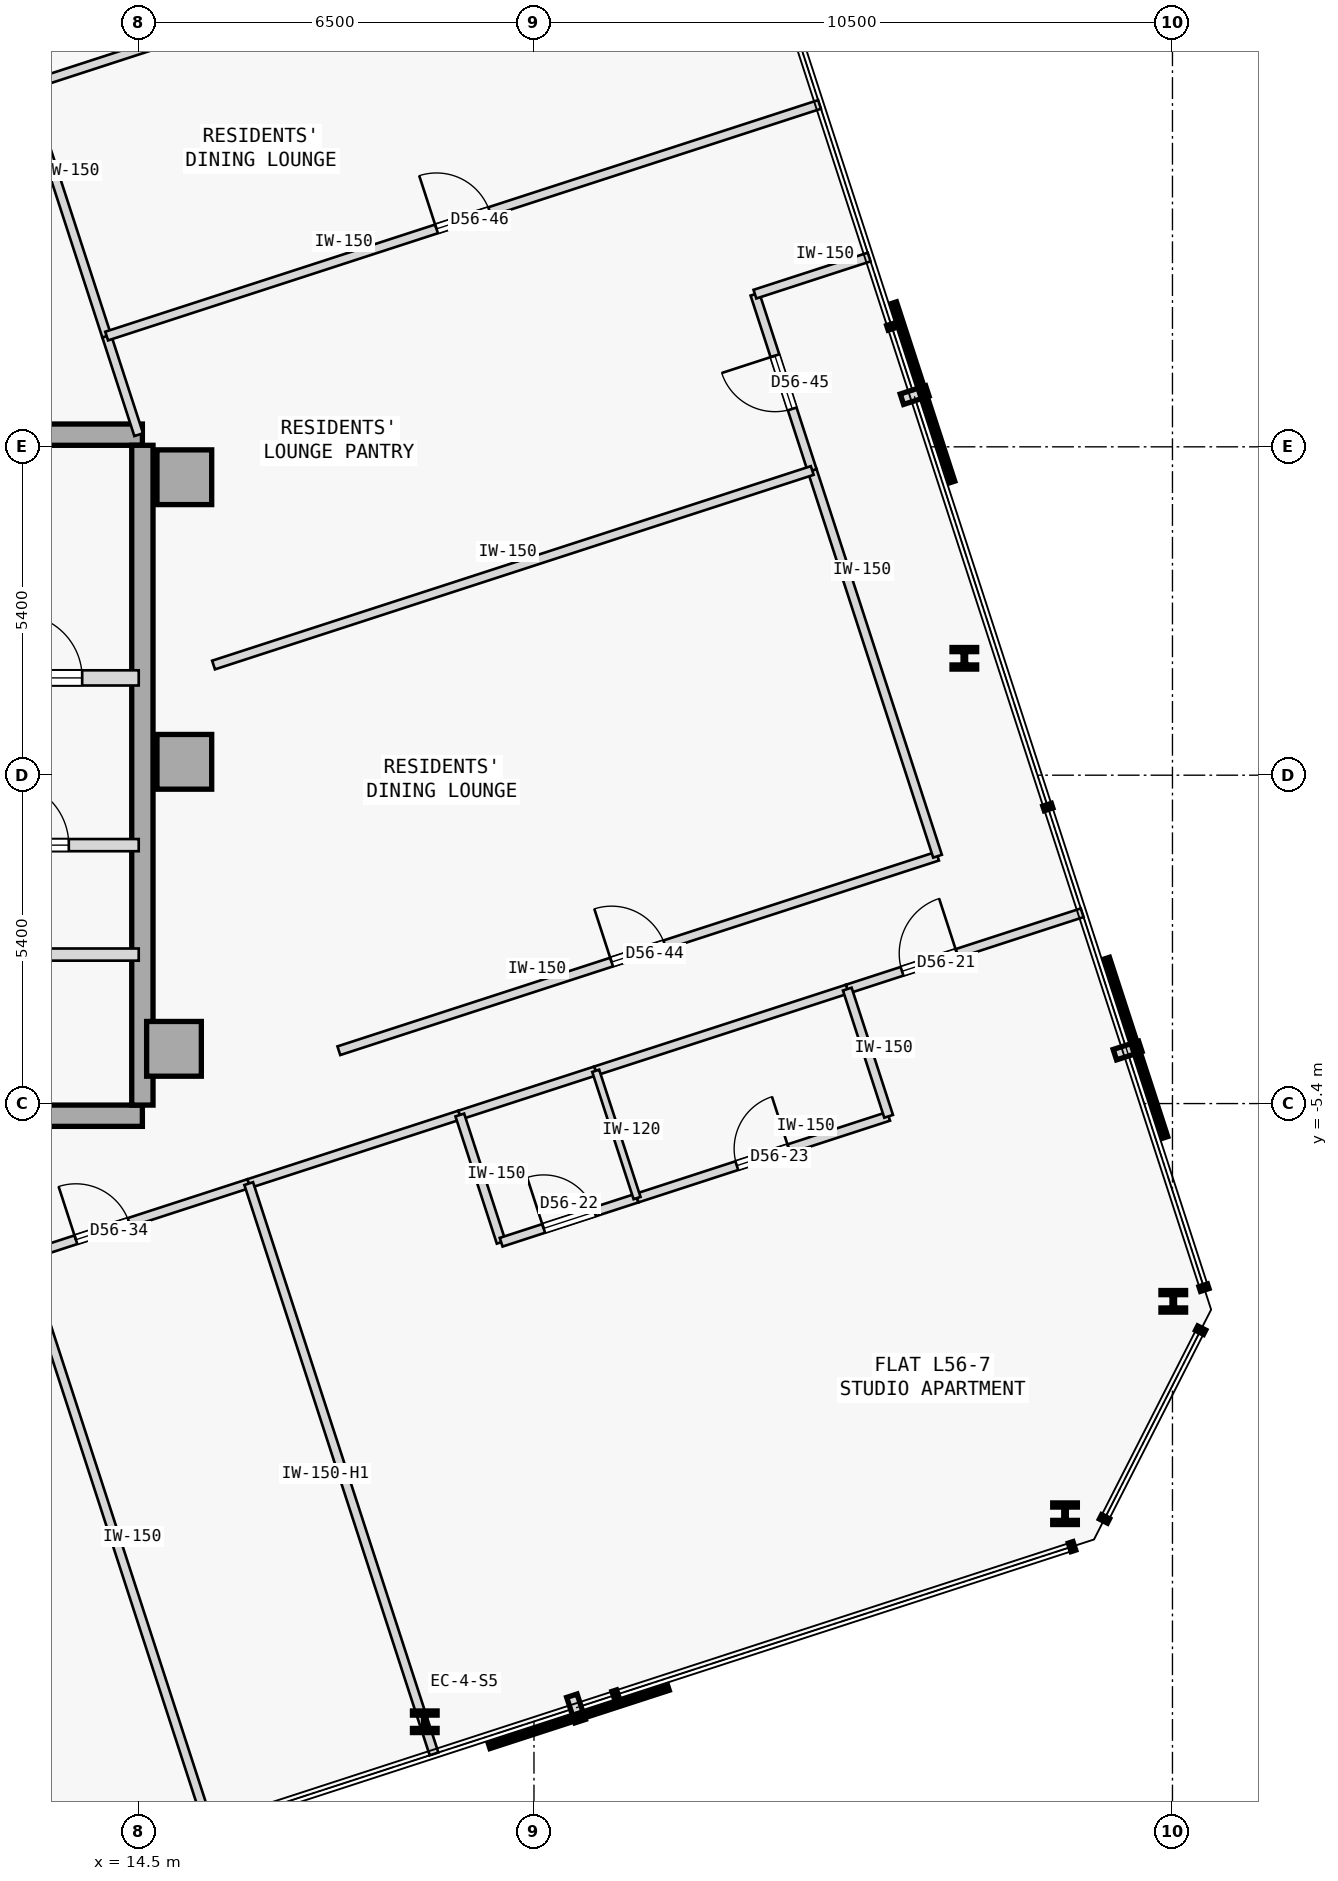
"""IFC4 building model, lengths in metres.
Left out: names, types, materials, properties, quantities, classifications, styles, units other than length and angle.
Written with IfcOpenShell. Run it as: python <this file> out.ifc"""

import sys

from ifc_helpers import new_model, si_unit, direction, frame, frame_2d, origin, origin_2d, place, context, subcontext, project, spatial, rectangle, i_section, extrude, element, fill, save


model = new_model("IFC4")
c1 = context("Model", 3, precision=1e-05, world=origin(), true_north=direction((0.0, 1.0)))
c2 = subcontext(c1, "Body", "Model", "MODEL_VIEW")
j1 = project(units=[si_unit("LENGTHUNIT", "METRE"), si_unit("PLANEANGLEUNIT", "RADIAN")], contexts=[c1])
p1 = place(None, origin())
s1 = spatial("IfcSite", under=j1, at=p1, CompositionType="ELEMENT")
p2 = place(p1, origin())
s2 = spatial("IfcBuilding", under=s1, at=p2, CompositionType="ELEMENT")
p3 = place(p2, frame((0.0, 0.0, 214.25)))
s3 = spatial("IfcBuildingStorey", under=s2, at=p3, CompositionType="ELEMENT", Elevation=214.25)
for number, where, z_axis, x_axis in (
    (1, (15.25, 4.9, 0.0), (0.0, 0.0, 1.0), (1.0, 0.0, 0.0)),
    (2, (15.25, 0.22, 0.0), (0.0, 0.0, 1.0), (1.0, 0.0, 0.0)),
    (3, (15.08, -4.5, 0.0), (0.0, 0.0, 1.0), (1.0, 0.0, 0.0)),
):
    element("IfcColumn", number, at=place(p3, frame(where, z_axis=z_axis, x_axis=x_axis)), inside=s3, PredefinedType="COLUMN", context=c2, shape_type="SweptSolid", body=[
        extrude(rectangle(XDim=0.9, YDim=0.9, at=origin_2d()), origin(), (0.0, 0.0, 1.0), 3.35),
    ])
p4 = place(p3, frame((3.15, 5.6, 0.0), z_axis=(0.0, 0.0, 1.0), x_axis=(1.0, 0.0, 0.0)))
e4 = element("IfcWall", 4, at=p4, inside=s3, PredefinedType="SHEAR", context=c2, shape_type="SweptSolid", body=[
    extrude(rectangle(XDim=11.41, YDim=0.35, at=frame_2d((5.705, 0.0))), origin(), (0.0, 0.0, 1.0), 3.125),
])
p5 = place(p3, frame((3.7, -5.6, 0.0), z_axis=(0.0, 0.0, 1.0), x_axis=(1.0, 0.0, 0.0)))
e5 = element("IfcWall", 5, at=p5, inside=s3, PredefinedType="SHEAR", context=c2, shape_type="SweptSolid", body=[
    extrude(rectangle(XDim=10.86, YDim=0.35, at=frame_2d((5.43, 0.0))), origin(), (0.0, 0.0, 1.0), 3.125),
])
p6 = place(p3, frame((14.56, -5.425, 0.0), z_axis=(0.0, 0.0, 1.0), x_axis=(0.0, 1.0, 0.0)))
e6 = element("IfcWall", 6, at=p6, inside=s3, PredefinedType="SHEAR", context=c2, shape_type="SweptSolid", body=[
    extrude(rectangle(XDim=10.85, YDim=0.35, at=frame_2d((5.425, 0.0))), origin(), (0.0, 0.0, 1.0), 3.125),
])
for number, where, z_axis, x_axis in (
    (7, (19.204, -15.566, 0.0), (0.0, 0.0, 1.0), (1.0, 0.0, 0.0)),
    (8, (29.734, -12.145, 0.0), (0.0, 0.0, 1.0), (1.0, 0.0, 0.0)),
    (9, (31.513, -8.652, 0.0), (0.0, 0.0, 1.0), (1.0, 0.0, 0.0)),
    (10, (28.078, 1.922, 0.0), (0.0, 0.0, 1.0), (1.0, 0.0, 0.0)),
):
    element("IfcColumn", number, at=place(p3, frame(where, z_axis=z_axis, x_axis=x_axis)), inside=s3, PredefinedType="COLUMN", context=c2, shape_type="SweptSolid", body=[
        extrude(i_section(OverallWidth=0.405, OverallDepth=0.355, WebThickness=0.042, FlangeThickness=0.068, FilletRadius=0.015, at=origin_2d()), origin(), (0.0, 0.0, 1.0), 3.35),
    ])
p7 = place(p3, frame((10.9, 1.6, 0.0), z_axis=(0.0, 0.0, 1.0), x_axis=(1.0, 0.0, 0.0)))
e11 = element("IfcWall", 11, at=p7, inside=s3, PredefinedType="STANDARD", context=c2, shape_type="SweptSolid", body=[
    extrude(rectangle(XDim=3.6, YDim=0.25, at=frame_2d((1.8, 0.0))), origin(), (0.0, 0.0, 1.0), 3.125),
])
p8 = place(p7, frame((1.62, 0.0, 0.0)))
e12 = element("IfcOpeningElement", 12, at=p8, cuts=e11, PredefinedType="OPENING", context=c2, shape_type="SweptSolid", body=[
    extrude(rectangle(XDim=1.05, YDim=2.15, at=frame_2d((0.525, 1.075))), frame((0.0, 0.135, 0.0), z_axis=(0.0, -1.0, 0.0), x_axis=(1.0, 0.0, 0.0)), (0.0, 0.0, 1.0), 0.27),
])
p9 = place(p3, frame((11.55, -1.15, 0.0), z_axis=(0.0, 0.0, 1.0), x_axis=(1.0, 0.0, 0.0)))
e13 = element("IfcWall", 13, at=p9, inside=s3, PredefinedType="STANDARD", context=c2, shape_type="SweptSolid", body=[
    extrude(rectangle(XDim=2.95, YDim=0.2, at=frame_2d((1.475, 0.0))), origin(), (0.0, 0.0, 1.0), 3.125),
])
p10 = place(p9, frame((0.75, 0.0, 0.0)))
e14 = element("IfcOpeningElement", 14, at=p10, cuts=e13, PredefinedType="OPENING", context=c2, shape_type="SweptSolid", body=[
    extrude(rectangle(XDim=1.05, YDim=2.18, at=frame_2d((0.525, 1.09))), frame((0.0, 0.11, 0.0), z_axis=(0.0, -1.0, 0.0), x_axis=(1.0, 0.0, 0.0)), (0.0, 0.0, 1.0), 0.22),
])
p11 = place(p3, frame((3.7, -2.95, 0.0), z_axis=(0.0, 0.0, 1.0), x_axis=(1.0, 0.0, 0.0)))
e15 = element("IfcWall", 15, at=p11, inside=s3, PredefinedType="STANDARD", context=c2, shape_type="SweptSolid", body=[
    extrude(rectangle(XDim=10.8, YDim=0.2, at=frame_2d((5.4, 0.0))), origin(), (0.0, 0.0, 1.0), 3.125),
])
p12 = place(p11, frame((0.53, 0.0, 0.0)))
e16 = element("IfcOpeningElement", 16, at=p12, cuts=e15, PredefinedType="OPENING", context=c2, shape_type="SweptSolid", body=[
    extrude(rectangle(XDim=1.1, YDim=2.15, at=frame_2d((0.55, 1.075))), frame((0.0, 0.11, 0.0), z_axis=(0.0, -1.0, 0.0), x_axis=(1.0, 0.0, 0.0)), (0.0, 0.0, 1.0), 0.22),
])
p13 = place(p11, frame((3.71, 0.0, 0.0)))
e17 = element("IfcOpeningElement", 17, at=p13, cuts=e15, PredefinedType="OPENING", context=c2, shape_type="SweptSolid", body=[
    extrude(rectangle(XDim=0.92, YDim=2.15, at=frame_2d((0.46, 1.075))), frame((0.0, 0.11, 0.0), z_axis=(0.0, -1.0, 0.0), x_axis=(1.0, 0.0, 0.0)), (0.0, 0.0, 1.0), 0.22),
])
p14 = place(p11, frame((8.03, 0.0, 0.0)))
e18 = element("IfcOpeningElement", 18, at=p14, cuts=e15, PredefinedType="OPENING", context=c2, shape_type="SweptSolid", body=[
    extrude(rectangle(XDim=0.92, YDim=2.15, at=frame_2d((0.46, 1.075))), frame((0.0, 0.11, 0.0), z_axis=(0.0, -1.0, 0.0), x_axis=(1.0, 0.0, 0.0)), (0.0, 0.0, 1.0), 0.22),
])
p15 = place(p3, frame((16.309, -6.716, 0.0), z_axis=(0.0, 0.0, 1.0), x_axis=(0.951057168147, 0.309014988174, 0.0)))
e19 = element("IfcWall", 19, at=p15, inside=s3, PredefinedType="PARTITIONING", context=c2, shape_type="SweptSolid", body=[
    extrude(rectangle(XDim=3.65, YDim=0.15, at=frame_2d((1.825, 0.0))), origin(), (0.0, 0.0, 1.0), 3.125),
])
p16 = place(p3, frame((26.152, -3.518, 0.0), z_axis=(0.0, 0.0, 1.0), x_axis=(0.951048201303, 0.309042584119, 0.0)))
e20 = element("IfcWall", 20, at=p16, inside=s3, PredefinedType="PARTITIONING", context=c2, shape_type="SweptSolid", body=[
    extrude(rectangle(XDim=4.062, YDim=0.15, at=frame_2d((2.031, 0.0))), origin(), (0.0, 0.0, 1.0), 3.125),
])
p17 = place(p16, frame((0.947, 0.0, 0.0)))
e21 = element("IfcOpeningElement", 21, at=p17, cuts=e20, PredefinedType="OPENING", context=c2, shape_type="SweptSolid", body=[
    extrude(rectangle(XDim=0.95, YDim=2.15, at=frame_2d((0.475, 1.075))), frame((0.0, 0.085, 0.0), z_axis=(0.0, -1.0, 0.0), x_axis=(1.0, 0.0, 0.0)), (0.0, 0.0, 1.0), 0.17),
])
p18 = place(p3, frame((19.78, -5.588, 0.0), z_axis=(0.0, 0.0, 1.0), x_axis=(0.951076048914, 0.308956872689, 0.0)))
e22 = element("IfcWall", 22, at=p18, inside=s3, PredefinedType="PARTITIONING", context=c2, shape_type="SweptSolid", body=[
    extrude(rectangle(XDim=2.35, YDim=0.15, at=frame_2d((1.175, 0.0))), origin(), (0.0, 0.0, 1.0), 3.125),
])
p19 = place(p3, frame((22.015, -4.862, 0.0), z_axis=(0.0, 0.0, 1.0), x_axis=(0.951052627573, 0.309028962374, 0.0)))
e23 = element("IfcWall", 23, at=p19, inside=s3, PredefinedType="PARTITIONING", context=c2, shape_type="SweptSolid", body=[
    extrude(rectangle(XDim=4.35, YDim=0.15, at=frame_2d((2.175, 0.0))), origin(), (0.0, 0.0, 1.0), 3.125),
])
p20 = place(p3, frame((12.609, -7.918, 0.0), z_axis=(0.0, 0.0, 1.0), x_axis=(0.951047443558, 0.309044915995, 0.0)))
e24 = element("IfcWall", 24, at=p20, inside=s3, PredefinedType="PARTITIONING", context=c2, shape_type="SweptSolid", body=[
    extrude(rectangle(XDim=3.89, YDim=0.15, at=frame_2d((1.945, 0.0))), origin(), (0.0, 0.0, 1.0), 3.125),
])
p21 = place(p20, frame((0.902, 0.0, 0.0)))
e25 = element("IfcOpeningElement", 25, at=p21, cuts=e24, PredefinedType="OPENING", context=c2, shape_type="SweptSolid", body=[
    extrude(rectangle(XDim=0.92, YDim=2.15, at=frame_2d((0.46, 1.075))), frame((0.0, 0.085, 0.0), z_axis=(0.0, -1.0, 0.0), x_axis=(1.0, 0.0, 0.0)), (0.0, 0.0, 1.0), 0.17),
])
p22 = place(p3, frame((17.791, -4.531, 0.0), z_axis=(0.0, 0.0, 1.0), x_axis=(0.951056769902, 0.309016213852, 0.0)))
e26 = element("IfcWall", 26, at=p22, inside=s3, PredefinedType="PARTITIONING", context=c2, shape_type="SweptSolid", body=[
    extrude(rectangle(XDim=10.352, YDim=0.15, at=frame_2d((5.176, 0.0))), origin(), (0.0, 0.0, 1.0), 3.125),
])
p23 = place(p22, frame((4.716, 0.0, 0.0)))
e27 = element("IfcOpeningElement", 27, at=p23, cuts=e26, PredefinedType="OPENING", context=c2, shape_type="SweptSolid", body=[
    extrude(rectangle(XDim=0.92, YDim=2.15, at=frame_2d((0.46, 1.075))), frame((0.0, 0.085, 0.0), z_axis=(0.0, -1.0, 0.0), x_axis=(1.0, 0.0, 0.0)), (0.0, 0.0, 1.0), 0.17),
])
p24 = place(p3, frame((27.637, -1.332, 0.0), z_axis=(0.0, 0.0, 1.0), x_axis=(-0.309047166719, 0.951046712177, 0.0)))
e28 = element("IfcWall", 28, at=p24, inside=s3, PredefinedType="PARTITIONING", context=c2, shape_type="SweptSolid", body=[
    extrude(rectangle(XDim=6.669, YDim=0.15, at=frame_2d((3.334, 0.0))), origin(), (0.0, 0.0, 1.0), 3.125),
])
p25 = place(p3, frame((25.576, 5.011, 0.0), z_axis=(0.0, 0.0, 1.0), x_axis=(-0.309011835091, 0.951058192633, 0.0)))
e29 = element("IfcWall", 29, at=p25, inside=s3, PredefinedType="PARTITIONING", context=c2, shape_type="SweptSolid", body=[
    extrude(rectangle(XDim=3.049, YDim=0.15, at=frame_2d((1.524, 0.0))), origin(), (0.0, 0.0, 1.0), 3.125),
])
p26 = place(p25, frame((1.064, 0.0, 0.0)))
e30 = element("IfcOpeningElement", 30, at=p26, cuts=e29, PredefinedType="OPENING", context=c2, shape_type="SweptSolid", body=[
    extrude(rectangle(XDim=0.92, YDim=2.15, at=frame_2d((0.46, 1.075))), frame((0.0, 0.085, 0.0), z_axis=(0.0, -1.0, 0.0), x_axis=(1.0, 0.0, 0.0)), (0.0, 0.0, 1.0), 0.17),
])
p27 = place(p3, frame((24.634, 7.91, 0.0), z_axis=(0.0, 0.0, 1.0), x_axis=(0.951054051148, 0.309024581215, 0.0)))
e31 = element("IfcWall", 31, at=p27, inside=s3, PredefinedType="PARTITIONING", context=c2, shape_type="SweptSolid", body=[
    extrude(rectangle(XDim=1.975, YDim=0.15, at=frame_2d((0.988, 0.0))), origin(), (0.0, 0.0, 1.0), 3.125),
])
p28 = place(p3, frame((20.46, -7.68, 0.0), z_axis=(0.0, 0.0, 1.0), x_axis=(-0.309060979314, 0.951042223598, 0.0)))
e32 = element("IfcWall", 32, at=p28, inside=s3, PredefinedType="PARTITIONING", context=c2, shape_type="SweptSolid", body=[
    extrude(rectangle(XDim=2.2, YDim=0.15, at=frame_2d((1.1, 0.0))), origin(), (0.0, 0.0, 1.0), 3.125),
])
p29 = place(p3, frame((20.46, -7.68, 0.0), z_axis=(0.0, 0.0, 1.0), x_axis=(0.951066131077, 0.308987401554, 0.0)))
e33 = element("IfcWall", 33, at=p29, inside=s3, PredefinedType="PARTITIONING", context=c2, shape_type="SweptSolid", body=[
    extrude(rectangle(XDim=2.35, YDim=0.15, at=frame_2d((1.175, 0.0))), origin(), (0.0, 0.0, 1.0), 3.125),
])
p30 = place(p29, frame((0.735, 0.0, 0.0)))
e34 = element("IfcOpeningElement", 34, at=p30, cuts=e33, PredefinedType="OPENING", context=c2, shape_type="SweptSolid", body=[
    extrude(rectangle(XDim=0.88, YDim=2.15, at=frame_2d((0.44, 1.075))), frame((0.0, 0.085, 0.0), z_axis=(0.0, -1.0, 0.0), x_axis=(1.0, 0.0, 0.0)), (0.0, 0.0, 1.0), 0.17),
])
p31 = place(p3, frame((22.695, -6.954, 0.0), z_axis=(0.0, 0.0, 1.0), x_axis=(0.951057987102, 0.309012467661, 0.0)))
e35 = element("IfcWall", 35, at=p31, inside=s3, PredefinedType="PARTITIONING", context=c2, shape_type="SweptSolid", body=[
    extrude(rectangle(XDim=4.35, YDim=0.15, at=frame_2d((2.175, 0.0))), origin(), (0.0, 0.0, 1.0), 3.125),
])
p32 = place(p31, frame((1.725, 0.0, 0.0)))
e36 = element("IfcOpeningElement", 36, at=p32, cuts=e35, PredefinedType="OPENING", context=c2, shape_type="SweptSolid", body=[
    extrude(rectangle(XDim=0.9, YDim=2.15, at=frame_2d((0.45, 1.075))), frame((0.0, 0.085, 0.0), z_axis=(0.0, -1.0, 0.0), x_axis=(1.0, 0.0, 0.0)), (0.0, 0.0, 1.0), 0.17),
])
p33 = place(p3, frame((26.832, -5.61, 0.0), z_axis=(0.0, 0.0, 1.0), x_axis=(-0.309060979314, 0.951042223598, 0.0)))
e37 = element("IfcWall", 37, at=p33, inside=s3, PredefinedType="PARTITIONING", context=c2, shape_type="SweptSolid", body=[
    extrude(rectangle(XDim=2.2, YDim=0.15, at=frame_2d((1.1, 0.0))), origin(), (0.0, 0.0, 1.0), 3.125),
])
p34 = place(p3, frame((19.356, -16.095, 0.0), z_axis=(0.0, 0.0, 1.0), x_axis=(-0.309022258842, 0.95105480575, 0.0)))
e38 = element("IfcWall", 38, at=p34, inside=s3, PredefinedType="PARTITIONING", context=c2, shape_type="SweptSolid", body=[
    extrude(rectangle(XDim=9.862, YDim=0.15, at=frame_2d((4.931, 0.0))), origin(), (0.0, 0.0, 1.0), 2.675),
])
p35 = place(p3, frame((22.695, -6.954, 0.0), z_axis=(0.0, 0.0, 1.0), x_axis=(-0.308960600764, 0.951074837842, 0.0)))
e39 = element("IfcWall", 39, at=p35, inside=s3, PredefinedType="PARTITIONING", context=c2, shape_type="SweptSolid", body=[
    extrude(rectangle(XDim=2.2, YDim=0.12, at=frame_2d((1.1, 0.0))), origin(), (0.0, 0.0, 1.0), 3.125),
])
p36 = place(p3, frame((15.657, -17.297, 0.0), z_axis=(0.0, 0.0, 1.0), x_axis=(-0.309029534558, 0.951052441651, 0.0)))
e40 = element("IfcWall", 40, at=p36, inside=s3, PredefinedType="PARTITIONING", context=c2, shape_type="SweptSolid", body=[
    extrude(rectangle(XDim=9.862, YDim=0.15, at=frame_2d((4.931, 0.0))), origin(), (0.0, 0.0, 1.0), 3.125),
])
p37 = place(p3, frame((14.5, 5.6, 0.0), z_axis=(0.0, 0.0, 1.0), x_axis=(-0.308872364299, 0.951103497298, 0.0)))
e41 = element("IfcWall", 41, at=p37, inside=s3, PredefinedType="PARTITIONING", context=c2, shape_type="SweptSolid", body=[
    extrude(rectangle(XDim=1.705, YDim=0.15, at=frame_2d((0.853, 0.0))), origin(), (0.0, 0.0, 1.0), 3.125),
])
p38 = place(p3, frame((13.973, 7.221, 0.0), z_axis=(0.0, 0.0, 1.0), x_axis=(-0.309038735568, 0.951049451879, 0.0)))
e42 = element("IfcWall", 42, at=p38, inside=s3, PredefinedType="PARTITIONING", context=c2, shape_type="SweptSolid", body=[
    extrude(rectangle(XDim=4.315, YDim=0.15, at=frame_2d((2.157, 0.0))), origin(), (0.0, 0.0, 1.0), 3.125),
])
p39 = place(p3, frame((15.73, 1.812, 0.0), z_axis=(0.0, 0.0, 1.0), x_axis=(0.951054517802, 0.309023145037, 0.0)))
e43 = element("IfcWall", 43, at=p39, inside=s3, PredefinedType="PARTITIONING", context=c2, shape_type="SweptSolid", body=[
    extrude(rectangle(XDim=10.352, YDim=0.15, at=frame_2d((5.176, 0.0))), origin(), (0.0, 0.0, 1.0), 3.125),
])
p40 = place(p3, frame((13.973, 7.221, 0.0), z_axis=(0.0, 0.0, 1.0), x_axis=(0.951058372493, 0.309011281527, 0.0)))
e44 = element("IfcWall", 44, at=p40, inside=s3, PredefinedType="PARTITIONING", context=c2, shape_type="SweptSolid", body=[
    extrude(rectangle(XDim=12.327, YDim=0.15, at=frame_2d((6.163, 0.0))), origin(), (0.0, 0.0, 1.0), 3.125),
])
p41 = place(p40, frame((5.704, 0.0, 0.0)))
e45 = element("IfcOpeningElement", 45, at=p41, cuts=e44, PredefinedType="OPENING", context=c2, shape_type="SweptSolid", body=[
    extrude(rectangle(XDim=0.92, YDim=2.15, at=frame_2d((0.46, 1.075))), frame((0.0, 0.085, 0.0), z_axis=(0.0, -1.0, 0.0), x_axis=(1.0, 0.0, 0.0)), (0.0, 0.0, 1.0), 0.17),
])
p42 = place(p3, frame((12.639, 11.325, 0.0), z_axis=(0.0, 0.0, 1.0), x_axis=(0.951054443032, 0.309023375149, 0.0)))
e46 = element("IfcWall", 46, at=p42, inside=s3, PredefinedType="PARTITIONING", context=c2, shape_type="SweptSolid", body=[
    extrude(rectangle(XDim=12.327, YDim=0.15, at=frame_2d((6.164, 0.0))), origin(), (0.0, 0.0, 1.0), 2.675),
])
p43 = place(p8, origin())
e47 = element("IfcDoor", 47, at=p43, inside=s3, OperationType="SINGLE_SWING_LEFT", PredefinedType="DOOR", context=c2, shape_type="SweptSolid", body=[
    extrude(rectangle(XDim=1.05, YDim=2.15, at=frame_2d((0.525, 1.075))), frame((0.0, 0.025, 0.0), z_axis=(0.0, -1.0, 0.0), x_axis=(1.0, 0.0, 0.0)), (0.0, 0.0, 1.0), 0.05),
])
fill(e12, e47)
p44 = place(p10, origin())
e48 = element("IfcDoor", 48, at=p44, inside=s3, OperationType="SINGLE_SWING_LEFT", PredefinedType="DOOR", context=c2, shape_type="SweptSolid", body=[
    extrude(rectangle(XDim=1.05, YDim=2.18, at=frame_2d((0.525, 1.09))), frame((0.0, 0.025, 0.0), z_axis=(0.0, -1.0, 0.0), x_axis=(1.0, 0.0, 0.0)), (0.0, 0.0, 1.0), 0.05),
])
fill(e14, e48)
p45 = place(p17, origin())
e49 = element("IfcDoor", 49, at=p45, inside=s3, OperationType="SINGLE_SWING_RIGHT", PredefinedType="DOOR", context=c2, shape_type="SweptSolid", body=[
    extrude(rectangle(XDim=0.95, YDim=2.15, at=frame_2d((0.475, 1.075))), frame((0.0, 0.025, 0.0), z_axis=(0.0, -1.0, 0.0), x_axis=(1.0, 0.0, 0.0)), (0.0, 0.0, 1.0), 0.05),
])
fill(e21, e49)
p46 = place(p30, origin())
e50 = element("IfcDoor", 50, at=p46, inside=s3, OperationType="SINGLE_SWING_LEFT", PredefinedType="DOOR", context=c2, shape_type="SweptSolid", body=[
    extrude(rectangle(XDim=0.88, YDim=2.15, at=frame_2d((0.44, 1.075))), frame((0.0, 0.025, 0.0), z_axis=(0.0, -1.0, 0.0), x_axis=(1.0, 0.0, 0.0)), (0.0, 0.0, 1.0), 0.05),
])
fill(e34, e50)
p47 = place(p32, origin())
e51 = element("IfcDoor", 51, at=p47, inside=s3, OperationType="SINGLE_SWING_RIGHT", PredefinedType="DOOR", context=c2, shape_type="SweptSolid", body=[
    extrude(rectangle(XDim=0.9, YDim=2.15, at=frame_2d((0.45, 1.075))), frame((0.0, 0.025, 0.0), z_axis=(0.0, -1.0, 0.0), x_axis=(1.0, 0.0, 0.0)), (0.0, 0.0, 1.0), 0.05),
])
fill(e36, e51)
p48 = place(p21, origin())
e52 = element("IfcDoor", 52, at=p48, inside=s3, OperationType="SINGLE_SWING_LEFT", PredefinedType="DOOR", context=c2, shape_type="SweptSolid", body=[
    extrude(rectangle(XDim=0.92, YDim=2.15, at=frame_2d((0.46, 1.075))), frame((0.0, 0.025, 0.0), z_axis=(0.0, -1.0, 0.0), x_axis=(1.0, 0.0, 0.0)), (0.0, 0.0, 1.0), 0.05),
])
fill(e25, e52)
p49 = place(p23, origin())
e53 = element("IfcDoor", 53, at=p49, inside=s3, OperationType="SINGLE_SWING_LEFT", PredefinedType="DOOR", context=c2, shape_type="SweptSolid", body=[
    extrude(rectangle(XDim=0.92, YDim=2.15, at=frame_2d((0.46, 1.075))), frame((0.0, 0.025, 0.0), z_axis=(0.0, -1.0, 0.0), x_axis=(1.0, 0.0, 0.0)), (0.0, 0.0, 1.0), 0.05),
])
fill(e27, e53)
p50 = place(p26, origin())
e54 = element("IfcDoor", 54, at=p50, inside=s3, OperationType="SINGLE_SWING_RIGHT", PredefinedType="DOOR", context=c2, shape_type="SweptSolid", body=[
    extrude(rectangle(XDim=0.92, YDim=2.15, at=frame_2d((0.46, 1.075))), frame((0.0, 0.025, 0.0), z_axis=(0.0, -1.0, 0.0), x_axis=(1.0, 0.0, 0.0)), (0.0, 0.0, 1.0), 0.05),
])
fill(e30, e54)
p51 = place(p41, origin())
e55 = element("IfcDoor", 55, at=p51, inside=s3, OperationType="SINGLE_SWING_LEFT", PredefinedType="DOOR", context=c2, shape_type="SweptSolid", body=[
    extrude(rectangle(XDim=0.92, YDim=2.15, at=frame_2d((0.46, 1.075))), frame((0.0, 0.025, 0.0), z_axis=(0.0, -1.0, 0.0), x_axis=(1.0, 0.0, 0.0)), (0.0, 0.0, 1.0), 0.05),
])
fill(e45, e55)
save(model, sys.argv[1])
